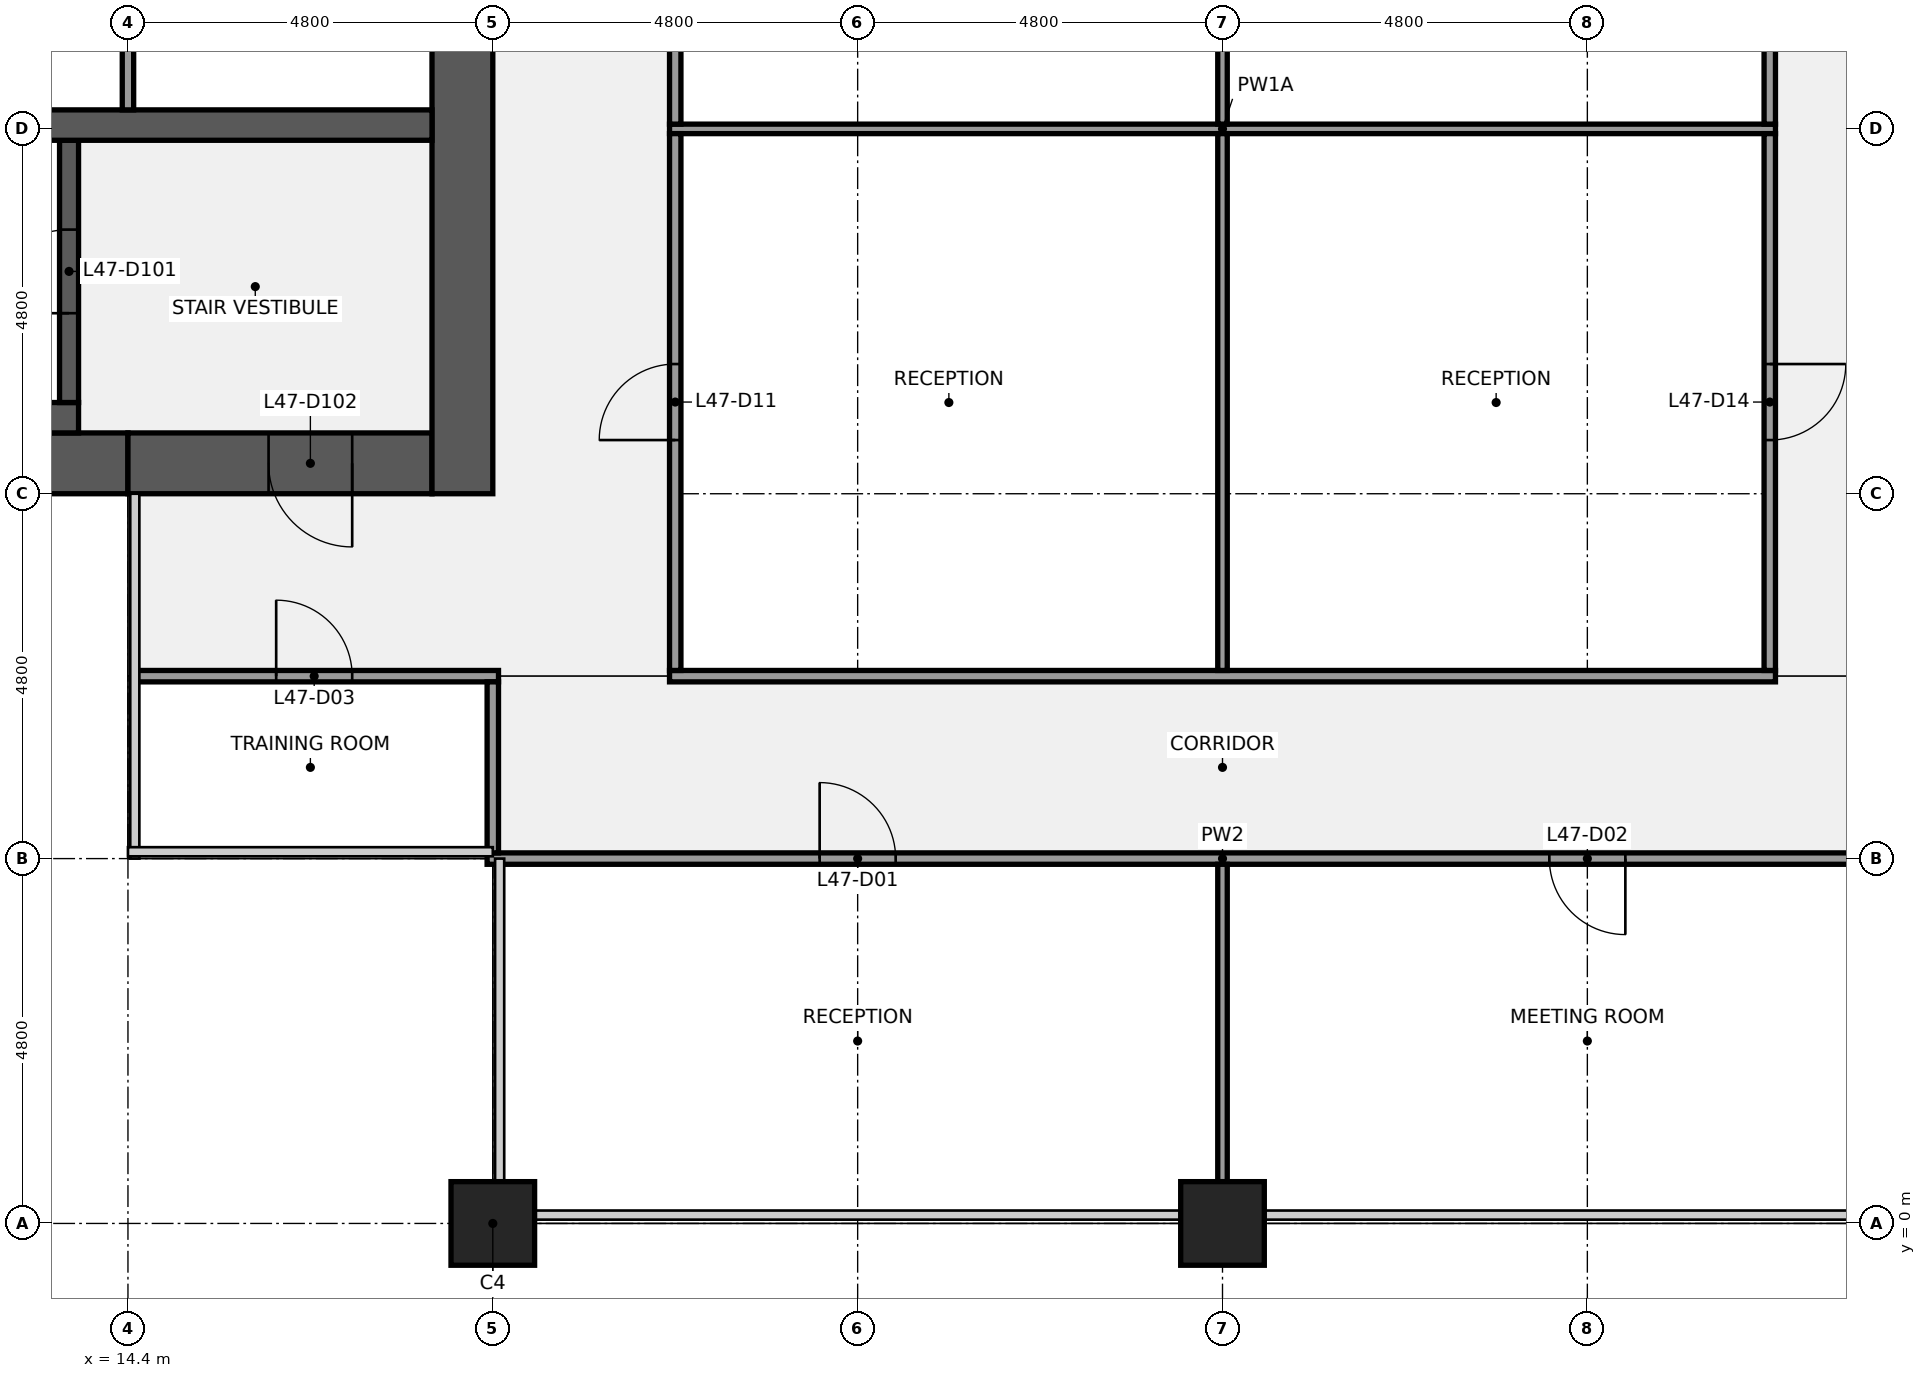
"""IFC4 building model, lengths in metres.
Left out: names, types, materials, properties, quantities, classifications, styles, units other than length and angle.
Written with IfcOpenShell. Run it as: python <this file> out.ifc"""

import sys

from ifc_helpers import new_model, si_unit, direction, frame, frame_2d, origin, origin_2d, place, context, subcontext, project, spatial, rectangle, extrude, element, fill, save


model = new_model("IFC4")
c1 = context("Model", 3, precision=1e-05, world=origin(), true_north=direction((0.0, 1.0)))
c2 = subcontext(c1, "Body", "Model", "MODEL_VIEW")
j1 = project(units=[si_unit("LENGTHUNIT", "METRE"), si_unit("PLANEANGLEUNIT", "RADIAN")], contexts=[c1])
p1 = place(None, origin())
s1 = spatial("IfcSite", under=j1, at=p1, CompositionType="ELEMENT")
p2 = place(p1, origin())
s2 = spatial("IfcBuilding", under=s1, at=p2, CompositionType="ELEMENT")
p3 = place(p2, frame((0.0, 0.0, 217.2)))
s3 = spatial("IfcBuildingStorey", under=s2, at=p3, CompositionType="ELEMENT", Elevation=217.2)
for number, where, z_axis, x_axis in (
    (1, (19.2, 0.0, 0.0), (0.0, 0.0, 1.0), (1.0, 0.0, 0.0)),
    (2, (28.8, 0.0, 0.0), (0.0, 0.0, 1.0), (1.0, 0.0, 0.0)),
):
    element("IfcColumn", number, at=place(p3, frame(where, z_axis=z_axis, x_axis=x_axis)), inside=s3, PredefinedType="COLUMN", context=c2, shape_type="SweptSolid", body=[
        extrude(rectangle(XDim=1.1, YDim=1.1, at=origin_2d()), origin(), (0.0, 0.0, 1.0), 4.0),
    ])
p4 = place(p3, frame((14.4, 10.0, 0.0), z_axis=(0.0, 0.0, 1.0), x_axis=(-1.0, 0.0, 0.0)))
e3 = element("IfcWall", 3, at=p4, inside=s3, PredefinedType="SHEAR", context=c2, shape_type="SweptSolid", body=[
    extrude(rectangle(XDim=13.6, YDim=0.8, at=frame_2d((6.8, 0.0))), origin(), (0.0, 0.0, 1.0), 3.84),
])
p5 = place(p4, frame((6.3, 0.0, 0.9)))
e4 = element("IfcOpeningElement", 4, at=p5, cuts=e3, PredefinedType="OPENING", context=c2, shape_type="SweptSolid", body=[
    extrude(rectangle(XDim=1.8, YDim=1.5, at=frame_2d((0.9, 0.75))), frame((0.0, 0.41, 0.0), z_axis=(0.0, -1.0, 0.0), x_axis=(1.0, 0.0, 0.0)), (0.0, 0.0, 1.0), 0.82),
])
p6 = place(p4, frame((1.5, 0.0, 0.9)))
e5 = element("IfcOpeningElement", 5, at=p6, cuts=e3, PredefinedType="OPENING", context=c2, shape_type="SweptSolid", body=[
    extrude(rectangle(XDim=1.8, YDim=1.5, at=frame_2d((0.9, 0.75))), frame((0.0, 0.41, 0.0), z_axis=(0.0, -1.0, 0.0), x_axis=(1.0, 0.0, 0.0)), (0.0, 0.0, 1.0), 0.82),
])
p7 = place(p3, frame((18.4, 10.0, 0.0), z_axis=(0.0, 0.0, 1.0), x_axis=(-1.0, 0.0, 0.0)))
e6 = element("IfcWall", 6, at=p7, inside=s3, PredefinedType="SHEAR", context=c2, shape_type="SweptSolid", body=[
    extrude(rectangle(XDim=4.0, YDim=0.8, at=frame_2d((2.0, 0.0))), origin(), (0.0, 0.0, 1.0), 3.84),
])
p8 = place(p7, frame((1.05, 0.0, 0.0)))
e7 = element("IfcOpeningElement", 7, at=p8, cuts=e6, PredefinedType="OPENING", context=c2, shape_type="SweptSolid", body=[
    extrude(rectangle(XDim=1.1, YDim=2.1, at=frame_2d((0.55, 1.05))), frame((0.0, 0.41, 0.0), z_axis=(0.0, -1.0, 0.0), x_axis=(1.0, 0.0, 0.0)), (0.0, 0.0, 1.0), 0.82),
])
p9 = place(p3, frame((18.8, 38.4, 0.0), z_axis=(0.0, 0.0, 1.0), x_axis=(0.0, -1.0, 0.0)))
e8 = element("IfcWall", 8, at=p9, inside=s3, PredefinedType="SHEAR", context=c2, shape_type="SweptSolid", body=[
    extrude(rectangle(XDim=28.8, YDim=0.8, at=frame_2d((14.4, 0.0))), origin(), (0.0, 0.0, 1.0), 3.84),
])
p10 = place(p9, frame((18.3, 0.0, 0.0)))
e9 = element("IfcOpeningElement", 9, at=p10, cuts=e8, PredefinedType="OPENING", context=c2, shape_type="SweptSolid", body=[
    extrude(rectangle(XDim=1.8, YDim=2.1, at=frame_2d((0.9, 1.05))), frame((0.0, 0.41, 0.0), z_axis=(0.0, -1.0, 0.0), x_axis=(1.0, 0.0, 0.0)), (0.0, 0.0, 1.0), 0.82),
])
p11 = place(p9, frame((8.7, 0.0, 0.0)))
e10 = element("IfcOpeningElement", 10, at=p11, cuts=e8, PredefinedType="OPENING", context=c2, shape_type="SweptSolid", body=[
    extrude(rectangle(XDim=1.8, YDim=2.1, at=frame_2d((0.9, 1.05))), frame((0.0, 0.41, 0.0), z_axis=(0.0, -1.0, 0.0), x_axis=(1.0, 0.0, 0.0)), (0.0, 0.0, 1.0), 0.82),
])
p12 = place(p3, frame((6.25, 10.6, 0.0), z_axis=(0.0, 0.0, 1.0), x_axis=(1.0, 0.0, 0.0)))
e11 = element("IfcWall", 11, at=p12, inside=s3, PredefinedType="SHEAR", context=c2, shape_type="SweptSolid", body=[
    extrude(rectangle(XDim=7.5, YDim=0.4, at=frame_2d((3.75, 0.0))), origin(), (0.0, 0.0, 1.0), 3.84),
])
p13 = place(p3, frame((13.625, 10.8, 0.0), z_axis=(0.0, 0.0, 1.0), x_axis=(0.0, 1.0, 0.0)))
e12 = element("IfcWall", 12, at=p13, inside=s3, PredefinedType="SHEAR", context=c2, shape_type="SweptSolid", body=[
    extrude(rectangle(XDim=3.45, YDim=0.25, at=frame_2d((1.725, 0.0))), origin(), (0.0, 0.0, 1.0), 3.84),
])
p14 = place(p13, frame((1.175, 0.0, 0.0)))
e13 = element("IfcOpeningElement", 13, at=p14, cuts=e12, PredefinedType="OPENING", context=c2, shape_type="SweptSolid", body=[
    extrude(rectangle(XDim=1.1, YDim=2.1, at=frame_2d((0.55, 1.05))), frame((0.0, 0.135, 0.0), z_axis=(0.0, -1.0, 0.0), x_axis=(1.0, 0.0, 0.0)), (0.0, 0.0, 1.0), 0.27),
])
p15 = place(p3, frame((0.8, 14.45, 0.0), z_axis=(0.0, 0.0, 1.0), x_axis=(1.0, 0.0, 0.0)))
e14 = element("IfcWall", 14, at=p15, inside=s3, PredefinedType="SHEAR", context=c2, shape_type="SweptSolid", body=[
    extrude(rectangle(XDim=17.6, YDim=0.4, at=frame_2d((8.8, 0.0))), origin(), (0.0, 0.0, 1.0), 3.84),
])
p16 = place(p3, frame((14.4, 14.65, 0.0), z_axis=(0.0, 0.0, 1.0), x_axis=(0.0, 1.0, 0.0)))
e15 = element("IfcWall", 15, at=p16, inside=s3, PredefinedType="PARTITIONING", context=c2, shape_type="SweptSolid", body=[
    extrude(rectangle(XDim=2.6, YDim=0.15, at=frame_2d((1.3, 0.0))), origin(), (0.0, 0.0, 1.0), 3.84),
])
p17 = place(p3, frame((19.125, 4.8, 0.0), z_axis=(0.0, 0.0, 1.0), x_axis=(1.0, 0.0, 0.0)))
e16 = element("IfcWall", 16, at=p17, inside=s3, PredefinedType="PARTITIONING", context=c2, shape_type="SweptSolid", body=[
    extrude(rectangle(XDim=19.35, YDim=0.15, at=frame_2d((9.675, 0.0))), origin(), (0.0, 0.0, 1.0), 2.849),
])
p18 = place(p17, frame((4.375, 0.0, 0.0)))
e17 = element("IfcOpeningElement", 17, at=p18, cuts=e16, PredefinedType="OPENING", context=c2, shape_type="SweptSolid", body=[
    extrude(rectangle(XDim=1.0, YDim=2.1, at=frame_2d((0.5, 1.05))), frame((0.0, 0.085, 0.0), z_axis=(0.0, -1.0, 0.0), x_axis=(1.0, 0.0, 0.0)), (0.0, 0.0, 1.0), 0.17),
])
p19 = place(p17, frame((13.975, 0.0, 0.0)))
e18 = element("IfcOpeningElement", 18, at=p19, cuts=e16, PredefinedType="OPENING", context=c2, shape_type="SweptSolid", body=[
    extrude(rectangle(XDim=1.0, YDim=2.1, at=frame_2d((0.5, 1.05))), frame((0.0, 0.085, 0.0), z_axis=(0.0, -1.0, 0.0), x_axis=(1.0, 0.0, 0.0)), (0.0, 0.0, 1.0), 0.17),
])
p20 = place(p3, frame((14.5, 7.2, 0.0), z_axis=(0.0, 0.0, 1.0), x_axis=(1.0, 0.0, 0.0)))
e19 = element("IfcWall", 19, at=p20, inside=s3, PredefinedType="PARTITIONING", context=c2, shape_type="SweptSolid", body=[
    extrude(rectangle(XDim=4.775, YDim=0.15, at=frame_2d((2.387, 0.0))), origin(), (0.0, 0.0, 1.0), 2.849),
])
p21 = place(p20, frame((1.85, 0.0, 0.0)))
e20 = element("IfcOpeningElement", 20, at=p21, cuts=e19, PredefinedType="OPENING", context=c2, shape_type="SweptSolid", body=[
    extrude(rectangle(XDim=1.0, YDim=2.1, at=frame_2d((0.5, 1.05))), frame((0.0, 0.085, 0.0), z_axis=(0.0, -1.0, 0.0), x_axis=(1.0, 0.0, 0.0)), (0.0, 0.0, 1.0), 0.17),
])
p22 = place(p3, frame((21.525, 7.2, 0.0), z_axis=(0.0, 0.0, 1.0), x_axis=(1.0, 0.0, 0.0)))
e21 = element("IfcWall", 21, at=p22, inside=s3, PredefinedType="PARTITIONING", context=c2, shape_type="SweptSolid", body=[
    extrude(rectangle(XDim=14.55, YDim=0.15, at=frame_2d((7.275, 0.0))), origin(), (0.0, 0.0, 1.0), 2.849),
])
p23 = place(p3, frame((21.525, 14.4, 0.0), z_axis=(0.0, 0.0, 1.0), x_axis=(1.0, 0.0, 0.0)))
e22 = element("IfcWall", 22, at=p23, inside=s3, PredefinedType="PARTITIONING", context=c2, shape_type="SweptSolid", body=[
    extrude(rectangle(XDim=14.55, YDim=0.125, at=frame_2d((7.275, 0.0))), origin(), (0.0, 0.0, 1.0), 2.849),
])
p24 = place(p3, frame((19.2, 4.875, 0.0), z_axis=(0.0, 0.0, 1.0), x_axis=(0.0, 1.0, 0.0)))
e23 = element("IfcWall", 23, at=p24, inside=s3, PredefinedType="PARTITIONING", context=c2, shape_type="SweptSolid", body=[
    extrude(rectangle(XDim=2.25, YDim=0.15, at=frame_2d((1.125, 0.0))), origin(), (0.0, 0.0, 1.0), 2.849),
])
p25 = place(p3, frame((21.6, 7.275, 0.0), z_axis=(0.0, 0.0, 1.0), x_axis=(0.0, 1.0, 0.0)))
e24 = element("IfcWall", 24, at=p25, inside=s3, PredefinedType="PARTITIONING", context=c2, shape_type="SweptSolid", body=[
    extrude(rectangle(XDim=7.062, YDim=0.15, at=frame_2d((3.531, 0.0))), origin(), (0.0, 0.0, 1.0), 2.849),
])
p26 = place(p25, frame((3.031, 0.0, 0.0)))
e25 = element("IfcOpeningElement", 25, at=p26, cuts=e24, PredefinedType="OPENING", context=c2, shape_type="SweptSolid", body=[
    extrude(rectangle(XDim=1.0, YDim=2.1, at=frame_2d((0.5, 1.05))), frame((0.0, 0.085, 0.0), z_axis=(0.0, -1.0, 0.0), x_axis=(1.0, 0.0, 0.0)), (0.0, 0.0, 1.0), 0.17),
])
p27 = place(p3, frame((21.6, 14.462, 0.0), z_axis=(0.0, 0.0, 1.0), x_axis=(0.0, 1.0, 0.0)))
e26 = element("IfcWall", 26, at=p27, inside=s3, PredefinedType="PARTITIONING", context=c2, shape_type="SweptSolid", body=[
    extrude(rectangle(XDim=9.475, YDim=0.15, at=frame_2d((4.738, 0.0))), origin(), (0.0, 0.0, 1.0), 2.849),
])
p28 = place(p27, frame((4.238, 0.0, 0.0)))
e27 = element("IfcOpeningElement", 27, at=p28, cuts=e26, PredefinedType="OPENING", context=c2, shape_type="SweptSolid", body=[
    extrude(rectangle(XDim=1.0, YDim=2.1, at=frame_2d((0.5, 1.05))), frame((0.0, 0.085, 0.0), z_axis=(0.0, -1.0, 0.0), x_axis=(1.0, 0.0, 0.0)), (0.0, 0.0, 1.0), 0.17),
])
p29 = place(p3, frame((28.8, 0.55, 0.0), z_axis=(0.0, 0.0, 1.0), x_axis=(0.0, 1.0, 0.0)))
e28 = element("IfcWall", 28, at=p29, inside=s3, PredefinedType="PARTITIONING", context=c2, shape_type="SweptSolid", body=[
    extrude(rectangle(XDim=4.175, YDim=0.125, at=frame_2d((2.087, 0.0))), origin(), (0.0, 0.0, 1.0), 2.849),
])
p30 = place(p3, frame((28.8, 7.275, 0.0), z_axis=(0.0, 0.0, 1.0), x_axis=(0.0, 1.0, 0.0)))
e29 = element("IfcWall", 29, at=p30, inside=s3, PredefinedType="PARTITIONING", context=c2, shape_type="SweptSolid", body=[
    extrude(rectangle(XDim=7.062, YDim=0.125, at=frame_2d((3.531, 0.0))), origin(), (0.0, 0.0, 1.0), 2.849),
])
p31 = place(p3, frame((28.8, 14.462, 0.0), z_axis=(0.0, 0.0, 1.0), x_axis=(0.0, 1.0, 0.0)))
e30 = element("IfcWall", 30, at=p31, inside=s3, PredefinedType="PARTITIONING", context=c2, shape_type="SweptSolid", body=[
    extrude(rectangle(XDim=9.475, YDim=0.125, at=frame_2d((4.738, 0.0))), origin(), (0.0, 0.0, 1.0), 2.849),
])
p32 = place(p3, frame((36.0, 7.275, 0.0), z_axis=(0.0, 0.0, 1.0), x_axis=(0.0, 1.0, 0.0)))
e31 = element("IfcWall", 31, at=p32, inside=s3, PredefinedType="PARTITIONING", context=c2, shape_type="SweptSolid", body=[
    extrude(rectangle(XDim=7.062, YDim=0.15, at=frame_2d((3.531, 0.0))), origin(), (0.0, 0.0, 1.0), 2.849),
])
p33 = place(p32, frame((3.031, 0.0, 0.0)))
e32 = element("IfcOpeningElement", 32, at=p33, cuts=e31, PredefinedType="OPENING", context=c2, shape_type="SweptSolid", body=[
    extrude(rectangle(XDim=1.0, YDim=2.1, at=frame_2d((0.5, 1.05))), frame((0.0, 0.085, 0.0), z_axis=(0.0, -1.0, 0.0), x_axis=(1.0, 0.0, 0.0)), (0.0, 0.0, 1.0), 0.17),
])
p34 = place(p3, frame((36.0, 14.462, 0.0), z_axis=(0.0, 0.0, 1.0), x_axis=(0.0, 1.0, 0.0)))
e33 = element("IfcWall", 33, at=p34, inside=s3, PredefinedType="PARTITIONING", context=c2, shape_type="SweptSolid", body=[
    extrude(rectangle(XDim=9.475, YDim=0.15, at=frame_2d((4.738, 0.0))), origin(), (0.0, 0.0, 1.0), 2.849),
])
p35 = place(p34, frame((4.238, 0.0, 0.0)))
e34 = element("IfcOpeningElement", 34, at=p35, cuts=e33, PredefinedType="OPENING", context=c2, shape_type="SweptSolid", body=[
    extrude(rectangle(XDim=1.0, YDim=2.1, at=frame_2d((0.5, 1.05))), frame((0.0, 0.085, 0.0), z_axis=(0.0, -1.0, 0.0), x_axis=(1.0, 0.0, 0.0)), (0.0, 0.0, 1.0), 0.17),
])
p36 = place(p3, frame((19.2, -1.025, 0.0), z_axis=(0.0, 0.0, 1.0), x_axis=(1.0, 0.0, 0.0)))
e35 = element("IfcColumn", 35, at=p36, inside=s3, PredefinedType="PILASTER", context=c2, shape_type="SweptSolid", body=[
    extrude(rectangle(XDim=2.4, YDim=0.95, at=origin_2d()), origin(), (0.0, 0.0, 1.0), 4.0),
])
p37 = place(p14, origin())
e36 = element("IfcDoor", 36, at=p37, inside=s3, OperationType="SINGLE_SWING_LEFT", PredefinedType="DOOR", context=c2, shape_type="SweptSolid", body=[
    extrude(rectangle(XDim=1.1, YDim=2.1, at=frame_2d((0.55, 1.05))), frame((0.0, 0.025, 0.0), z_axis=(0.0, -1.0, 0.0), x_axis=(1.0, 0.0, 0.0)), (0.0, 0.0, 1.0), 0.05),
])
fill(e13, e36)
p38 = place(p8, origin())
e37 = element("IfcDoor", 37, at=p38, inside=s3, OperationType="SINGLE_SWING_LEFT", PredefinedType="DOOR", context=c2, shape_type="SweptSolid", body=[
    extrude(rectangle(XDim=1.1, YDim=2.1, at=frame_2d((0.55, 1.05))), frame((0.0, 0.025, 0.0), z_axis=(0.0, -1.0, 0.0), x_axis=(1.0, 0.0, 0.0)), (0.0, 0.0, 1.0), 0.05),
])
fill(e7, e37)
p39 = place(p18, origin())
e38 = element("IfcDoor", 38, at=p39, inside=s3, OperationType="SINGLE_SWING_LEFT", PredefinedType="DOOR", context=c2, shape_type="SweptSolid", body=[
    extrude(rectangle(XDim=1.0, YDim=2.1, at=frame_2d((0.5, 1.05))), frame((0.0, 0.025, 0.0), z_axis=(0.0, -1.0, 0.0), x_axis=(1.0, 0.0, 0.0)), (0.0, 0.0, 1.0), 0.05),
])
fill(e17, e38)
p40 = place(p19, origin())
e39 = element("IfcDoor", 39, at=p40, inside=s3, OperationType="SINGLE_SWING_RIGHT", PredefinedType="DOOR", context=c2, shape_type="SweptSolid", body=[
    extrude(rectangle(XDim=1.0, YDim=2.1, at=frame_2d((0.5, 1.05))), frame((0.0, 0.025, 0.0), z_axis=(0.0, -1.0, 0.0), x_axis=(1.0, 0.0, 0.0)), (0.0, 0.0, 1.0), 0.05),
])
fill(e18, e39)
p41 = place(p21, origin())
e40 = element("IfcDoor", 40, at=p41, inside=s3, OperationType="SINGLE_SWING_LEFT", PredefinedType="DOOR", context=c2, shape_type="SweptSolid", body=[
    extrude(rectangle(XDim=1.0, YDim=2.1, at=frame_2d((0.5, 1.05))), frame((0.0, 0.025, 0.0), z_axis=(0.0, -1.0, 0.0), x_axis=(1.0, 0.0, 0.0)), (0.0, 0.0, 1.0), 0.05),
])
fill(e20, e40)
p42 = place(p26, origin())
e41 = element("IfcDoor", 41, at=p42, inside=s3, OperationType="SINGLE_SWING_LEFT", PredefinedType="DOOR", context=c2, shape_type="SweptSolid", body=[
    extrude(rectangle(XDim=1.0, YDim=2.1, at=frame_2d((0.5, 1.05))), frame((0.0, 0.025, 0.0), z_axis=(0.0, -1.0, 0.0), x_axis=(1.0, 0.0, 0.0)), (0.0, 0.0, 1.0), 0.05),
])
fill(e25, e41)
p43 = place(p33, origin())
e42 = element("IfcDoor", 42, at=p43, inside=s3, OperationType="SINGLE_SWING_RIGHT", PredefinedType="DOOR", context=c2, shape_type="SweptSolid", body=[
    extrude(rectangle(XDim=1.0, YDim=2.1, at=frame_2d((0.5, 1.05))), frame((0.0, 0.025, 0.0), z_axis=(0.0, -1.0, 0.0), x_axis=(1.0, 0.0, 0.0)), (0.0, 0.0, 1.0), 0.05),
])
fill(e32, e42)
save(model, sys.argv[1])
